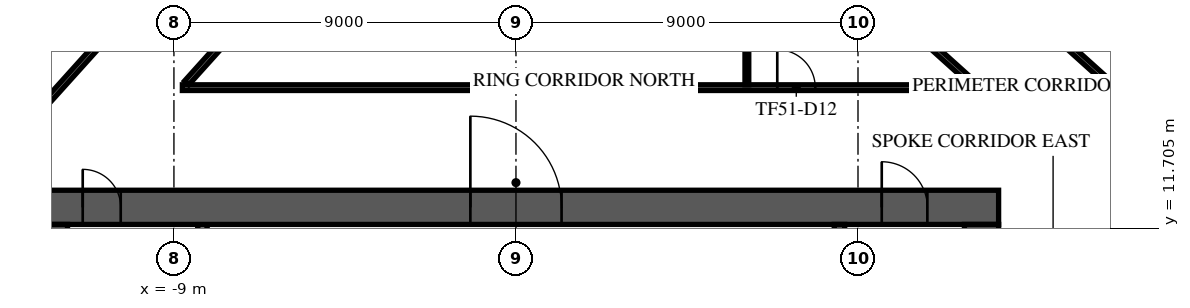
"""IFC4 building model, lengths in metres.
Left out: names, types, materials, properties, quantities, classifications, styles, units other than length and angle.
Written with IfcOpenShell. Run it as: python <this file> out.ifc"""

import sys

from ifc_helpers import new_model, si_unit, direction, frame, frame_2d, origin, place, context, subcontext, project, spatial, rectangle, extrude, element, fill, save


model = new_model("IFC4")
c1 = context("Model", 3, precision=1e-05, world=origin(), true_north=direction((0.0, 1.0)))
c2 = subcontext(c1, "Body", "Model", "MODEL_VIEW")
j1 = project(units=[si_unit("LENGTHUNIT", "METRE"), si_unit("PLANEANGLEUNIT", "RADIAN")], contexts=[c1])
p1 = place(None, origin())
s1 = spatial("IfcSite", under=j1, at=p1, CompositionType="ELEMENT")
p2 = place(p1, origin())
s2 = spatial("IfcBuilding", under=s1, at=p2, CompositionType="ELEMENT")
p3 = place(p2, frame((0.0, 0.0, 217.3)))
s3 = spatial("IfcBuildingStorey", under=s2, at=p3, CompositionType="ELEMENT", Elevation=217.3)
p4 = place(p3, frame((-12.7, 12.25, 0.0), z_axis=(0.0, 0.0, 1.0), x_axis=(1.0, 0.0, 0.0)))
e1 = element("IfcWall", 1, at=p4, inside=s3, PredefinedType="SHEAR", context=c2, shape_type="SweptSolid", body=[
    extrude(rectangle(XDim=25.4, YDim=0.9, at=frame_2d((12.7, 0.0))), origin(), (0.0, 0.0, 1.0), 3.62),
])
p5 = place(p4, frame((11.5, 0.0, 0.0)))
e2 = element("IfcOpeningElement", 2, at=p5, cuts=e1, PredefinedType="OPENING", context=c2, shape_type="SweptSolid", body=[
    extrude(rectangle(XDim=2.4, YDim=2.4, at=frame_2d((1.2, 1.2))), frame((0.0, 0.46, 0.0), z_axis=(0.0, -1.0, 0.0), x_axis=(1.0, 0.0, 0.0)), (0.0, 0.0, 1.0), 0.92),
])
p6 = place(p4, frame((22.325, 0.0, 0.0)))
e3 = element("IfcOpeningElement", 3, at=p6, cuts=e1, PredefinedType="OPENING", context=c2, shape_type="SweptSolid", body=[
    extrude(rectangle(XDim=1.2, YDim=2.1, at=frame_2d((0.6, 1.05))), frame((0.0, 0.46, 0.0), z_axis=(0.0, -1.0, 0.0), x_axis=(1.0, 0.0, 0.0)), (0.0, 0.0, 1.0), 0.92),
])
p7 = place(p4, frame((1.3, 0.0, 0.0)))
e4 = element("IfcOpeningElement", 4, at=p7, cuts=e1, PredefinedType="OPENING", context=c2, shape_type="SweptSolid", body=[
    extrude(rectangle(XDim=1.0, YDim=2.1, at=frame_2d((0.5, 1.05))), frame((0.0, 0.46, 0.0), z_axis=(0.0, -1.0, 0.0), x_axis=(1.0, 0.0, 0.0)), (0.0, 0.0, 1.0), 0.92),
])
p8 = place(p3, frame((12.25, -11.8, 0.0), z_axis=(0.0, 0.0, 1.0), x_axis=(0.0, 1.0, 0.0)))
e5 = element("IfcWall", 5, at=p8, inside=s3, PredefinedType="SHEAR", context=c2, shape_type="SweptSolid", body=[
    extrude(rectangle(XDim=23.6, YDim=0.9, at=frame_2d((11.8, 0.0))), origin(), (0.0, 0.0, 1.0), 3.62),
])
p9 = place(p8, frame((10.6, 0.0, 0.0)))
e6 = element("IfcOpeningElement", 6, at=p9, cuts=e5, PredefinedType="OPENING", context=c2, shape_type="SweptSolid", body=[
    extrude(rectangle(XDim=2.4, YDim=2.4, at=frame_2d((1.2, 1.2))), frame((0.0, 0.46, 0.0), z_axis=(0.0, -1.0, 0.0), x_axis=(1.0, 0.0, 0.0)), (0.0, 0.0, 1.0), 0.92),
])
p10 = place(p3, frame((-12.25, -11.8, 0.0), z_axis=(0.0, 0.0, 1.0), x_axis=(0.0, 1.0, 0.0)))
e7 = element("IfcWall", 7, at=p10, inside=s3, PredefinedType="SHEAR", context=c2, shape_type="SweptSolid", body=[
    extrude(rectangle(XDim=23.6, YDim=0.9, at=frame_2d((11.8, 0.0))), origin(), (0.0, 0.0, 1.0), 3.62),
])
p11 = place(p10, frame((10.6, 0.0, 0.0)))
e8 = element("IfcOpeningElement", 8, at=p11, cuts=e7, PredefinedType="OPENING", context=c2, shape_type="SweptSolid", body=[
    extrude(rectangle(XDim=2.4, YDim=2.4, at=frame_2d((1.2, 1.2))), frame((0.0, 0.46, 0.0), z_axis=(0.0, -1.0, 0.0), x_axis=(1.0, 0.0, 0.0)), (0.0, 0.0, 1.0), 0.92),
])
p12 = place(p3, frame((8.512, 4.55, 0.0), z_axis=(0.0, 0.0, 1.0), x_axis=(0.0, 1.0, 0.0)))
e9 = element("IfcWall", 9, at=p12, inside=s3, PredefinedType="SOLIDWALL", context=c2, shape_type="SweptSolid", body=[
    extrude(rectangle(XDim=7.25, YDim=0.275, at=frame_2d((3.625, 0.0))), origin(), (0.0, 0.0, 1.0), 3.62),
])
p13 = place(p12, frame((6.0, 0.0, 0.0)))
e10 = element("IfcOpeningElement", 10, at=p13, cuts=e9, PredefinedType="OPENING", context=c2, shape_type="SweptSolid", body=[
    extrude(rectangle(XDim=1.0, YDim=2.1, at=frame_2d((0.5, 1.05))), frame((0.0, 0.147, 0.0), z_axis=(0.0, -1.0, 0.0), x_axis=(1.0, 0.0, 0.0)), (0.0, 0.0, 1.0), 0.295),
])
p14 = place(p3, frame((-8.25, 8.805, 0.0), z_axis=(0.0, 0.0, 1.0), x_axis=(0.0, 1.0, 0.0)))
e11 = element("IfcWall", 11, at=p14, inside=s3, PredefinedType="PARTITIONING", context=c2, shape_type="SweptSolid", body=[
    extrude(rectangle(XDim=2.99, YDim=0.25, at=frame_2d((1.495, 0.0))), origin(), (0.0, 0.0, 1.0), 3.62),
])
p15 = place(p14, frame((0.895, 0.0, 0.0)))
e12 = element("IfcOpeningElement", 12, at=p15, cuts=e11, PredefinedType="OPENING", context=c2, shape_type="SweptSolid", body=[
    extrude(rectangle(XDim=1.0, YDim=2.1, at=frame_2d((0.5, 1.05))), frame((0.0, 0.135, 0.0), z_axis=(0.0, -1.0, 0.0), x_axis=(1.0, 0.0, 0.0)), (0.0, 0.0, 1.0), 0.27),
])
p16 = place(p3, frame((-1.962, 34.735, 0.0), z_axis=(0.0, 0.0, 1.0), x_axis=(-0.669133181838, -0.743142506497, 0.0)))
e13 = element("IfcWall", 13, at=p16, inside=s3, PredefinedType="STANDARD", context=c2, shape_type="SweptSolid", body=[
    extrude(rectangle(XDim=49.0, YDim=0.6, at=frame_2d((24.5, 0.0))), origin(), (0.0, 0.0, 1.0), 3.62),
])
p17 = place(p16, frame((1.227, 0.0, 0.9)))
e14 = element("IfcOpeningElement", 14, at=p17, cuts=e13, PredefinedType="OPENING", context=c2, shape_type="SweptSolid", body=[
    extrude(rectangle(XDim=2.0, YDim=2.1, at=frame_2d((1.0, 1.05))), frame((0.0, 0.31, 0.0), z_axis=(0.0, -1.0, 0.0), x_axis=(1.0, 0.0, 0.0)), (0.0, 0.0, 1.0), 0.62),
])
p18 = place(p16, frame((5.682, 0.0, 0.9)))
e15 = element("IfcOpeningElement", 15, at=p18, cuts=e13, PredefinedType="OPENING", context=c2, shape_type="SweptSolid", body=[
    extrude(rectangle(XDim=2.0, YDim=2.1, at=frame_2d((1.0, 1.05))), frame((0.0, 0.31, 0.0), z_axis=(0.0, -1.0, 0.0), x_axis=(1.0, 0.0, 0.0)), (0.0, 0.0, 1.0), 0.62),
])
p19 = place(p16, frame((10.136, 0.0, 0.9)))
e16 = element("IfcOpeningElement", 16, at=p19, cuts=e13, PredefinedType="OPENING", context=c2, shape_type="SweptSolid", body=[
    extrude(rectangle(XDim=2.0, YDim=2.1, at=frame_2d((1.0, 1.05))), frame((0.0, 0.31, 0.0), z_axis=(0.0, -1.0, 0.0), x_axis=(1.0, 0.0, 0.0)), (0.0, 0.0, 1.0), 0.62),
])
p20 = place(p16, frame((14.591, 0.0, 0.9)))
e17 = element("IfcOpeningElement", 17, at=p20, cuts=e13, PredefinedType="OPENING", context=c2, shape_type="SweptSolid", body=[
    extrude(rectangle(XDim=2.0, YDim=2.1, at=frame_2d((1.0, 1.05))), frame((0.0, 0.31, 0.0), z_axis=(0.0, -1.0, 0.0), x_axis=(1.0, 0.0, 0.0)), (0.0, 0.0, 1.0), 0.62),
])
p21 = place(p16, frame((19.045, 0.0, 0.9)))
e18 = element("IfcOpeningElement", 18, at=p21, cuts=e13, PredefinedType="OPENING", context=c2, shape_type="SweptSolid", body=[
    extrude(rectangle(XDim=2.0, YDim=2.1, at=frame_2d((1.0, 1.05))), frame((0.0, 0.31, 0.0), z_axis=(0.0, -1.0, 0.0), x_axis=(1.0, 0.0, 0.0)), (0.0, 0.0, 1.0), 0.62),
])
p22 = place(p16, frame((23.5, 0.0, 0.9)))
e19 = element("IfcOpeningElement", 19, at=p22, cuts=e13, PredefinedType="OPENING", context=c2, shape_type="SweptSolid", body=[
    extrude(rectangle(XDim=2.0, YDim=2.1, at=frame_2d((1.0, 1.05))), frame((0.0, 0.31, 0.0), z_axis=(0.0, -1.0, 0.0), x_axis=(1.0, 0.0, 0.0)), (0.0, 0.0, 1.0), 0.62),
])
p23 = place(p16, frame((27.955, 0.0, 0.9)))
e20 = element("IfcOpeningElement", 20, at=p23, cuts=e13, PredefinedType="OPENING", context=c2, shape_type="SweptSolid", body=[
    extrude(rectangle(XDim=2.0, YDim=2.1, at=frame_2d((1.0, 1.05))), frame((0.0, 0.31, 0.0), z_axis=(0.0, -1.0, 0.0), x_axis=(1.0, 0.0, 0.0)), (0.0, 0.0, 1.0), 0.62),
])
p24 = place(p16, frame((32.409, 0.0, 0.9)))
e21 = element("IfcOpeningElement", 21, at=p24, cuts=e13, PredefinedType="OPENING", context=c2, shape_type="SweptSolid", body=[
    extrude(rectangle(XDim=2.0, YDim=2.1, at=frame_2d((1.0, 1.05))), frame((0.0, 0.31, 0.0), z_axis=(0.0, -1.0, 0.0), x_axis=(1.0, 0.0, 0.0)), (0.0, 0.0, 1.0), 0.62),
])
p25 = place(p16, frame((36.864, 0.0, 0.9)))
e22 = element("IfcOpeningElement", 22, at=p25, cuts=e13, PredefinedType="OPENING", context=c2, shape_type="SweptSolid", body=[
    extrude(rectangle(XDim=2.0, YDim=2.1, at=frame_2d((1.0, 1.05))), frame((0.0, 0.31, 0.0), z_axis=(0.0, -1.0, 0.0), x_axis=(1.0, 0.0, 0.0)), (0.0, 0.0, 1.0), 0.62),
])
p26 = place(p16, frame((41.318, 0.0, 0.9)))
e23 = element("IfcOpeningElement", 23, at=p26, cuts=e13, PredefinedType="OPENING", context=c2, shape_type="SweptSolid", body=[
    extrude(rectangle(XDim=2.0, YDim=2.1, at=frame_2d((1.0, 1.05))), frame((0.0, 0.31, 0.0), z_axis=(0.0, -1.0, 0.0), x_axis=(1.0, 0.0, 0.0)), (0.0, 0.0, 1.0), 0.62),
])
p27 = place(p16, frame((45.773, 0.0, 0.9)))
e24 = element("IfcOpeningElement", 24, at=p27, cuts=e13, PredefinedType="OPENING", context=c2, shape_type="SweptSolid", body=[
    extrude(rectangle(XDim=2.0, YDim=2.1, at=frame_2d((1.0, 1.05))), frame((0.0, 0.31, 0.0), z_axis=(0.0, -1.0, 0.0), x_axis=(1.0, 0.0, 0.0)), (0.0, 0.0, 1.0), 0.62),
])
p28 = place(p3, frame((34.365, 9.023, 0.0), z_axis=(0.0, 0.0, 1.0), x_axis=(-0.743146896498, 0.66912830625, 0.0)))
e25 = element("IfcWall", 25, at=p28, inside=s3, PredefinedType="STANDARD", context=c2, shape_type="SweptSolid", body=[
    extrude(rectangle(XDim=39.0, YDim=0.6, at=frame_2d((19.5, 0.0))), origin(), (0.0, 0.0, 1.0), 3.62),
])
p29 = place(p28, frame((1.217, 0.0, 0.9)))
e26 = element("IfcOpeningElement", 26, at=p29, cuts=e25, PredefinedType="OPENING", context=c2, shape_type="SweptSolid", body=[
    extrude(rectangle(XDim=1.9, YDim=2.1, at=frame_2d((0.95, 1.05))), frame((0.0, 0.31, 0.0), z_axis=(0.0, -1.0, 0.0), x_axis=(1.0, 0.0, 0.0)), (0.0, 0.0, 1.0), 0.62),
])
p30 = place(p28, frame((5.55, 0.0, 0.9)))
e27 = element("IfcOpeningElement", 27, at=p30, cuts=e25, PredefinedType="OPENING", context=c2, shape_type="SweptSolid", body=[
    extrude(rectangle(XDim=1.9, YDim=2.1, at=frame_2d((0.95, 1.05))), frame((0.0, 0.31, 0.0), z_axis=(0.0, -1.0, 0.0), x_axis=(1.0, 0.0, 0.0)), (0.0, 0.0, 1.0), 0.62),
])
p31 = place(p28, frame((9.883, 0.0, 0.9)))
e28 = element("IfcOpeningElement", 28, at=p31, cuts=e25, PredefinedType="OPENING", context=c2, shape_type="SweptSolid", body=[
    extrude(rectangle(XDim=1.9, YDim=2.1, at=frame_2d((0.95, 1.05))), frame((0.0, 0.31, 0.0), z_axis=(0.0, -1.0, 0.0), x_axis=(1.0, 0.0, 0.0)), (0.0, 0.0, 1.0), 0.62),
])
p32 = place(p28, frame((14.217, 0.0, 0.9)))
e29 = element("IfcOpeningElement", 29, at=p32, cuts=e25, PredefinedType="OPENING", context=c2, shape_type="SweptSolid", body=[
    extrude(rectangle(XDim=1.9, YDim=2.1, at=frame_2d((0.95, 1.05))), frame((0.0, 0.31, 0.0), z_axis=(0.0, -1.0, 0.0), x_axis=(1.0, 0.0, 0.0)), (0.0, 0.0, 1.0), 0.62),
])
p33 = place(p28, frame((18.55, 0.0, 0.9)))
e30 = element("IfcOpeningElement", 30, at=p33, cuts=e25, PredefinedType="OPENING", context=c2, shape_type="SweptSolid", body=[
    extrude(rectangle(XDim=1.9, YDim=2.1, at=frame_2d((0.95, 1.05))), frame((0.0, 0.31, 0.0), z_axis=(0.0, -1.0, 0.0), x_axis=(1.0, 0.0, 0.0)), (0.0, 0.0, 1.0), 0.62),
])
p34 = place(p28, frame((22.883, 0.0, 0.9)))
e31 = element("IfcOpeningElement", 31, at=p34, cuts=e25, PredefinedType="OPENING", context=c2, shape_type="SweptSolid", body=[
    extrude(rectangle(XDim=1.9, YDim=2.1, at=frame_2d((0.95, 1.05))), frame((0.0, 0.31, 0.0), z_axis=(0.0, -1.0, 0.0), x_axis=(1.0, 0.0, 0.0)), (0.0, 0.0, 1.0), 0.62),
])
p35 = place(p28, frame((27.217, 0.0, 0.9)))
e32 = element("IfcOpeningElement", 32, at=p35, cuts=e25, PredefinedType="OPENING", context=c2, shape_type="SweptSolid", body=[
    extrude(rectangle(XDim=1.9, YDim=2.1, at=frame_2d((0.95, 1.05))), frame((0.0, 0.31, 0.0), z_axis=(0.0, -1.0, 0.0), x_axis=(1.0, 0.0, 0.0)), (0.0, 0.0, 1.0), 0.62),
])
p36 = place(p28, frame((31.55, 0.0, 0.9)))
e33 = element("IfcOpeningElement", 33, at=p36, cuts=e25, PredefinedType="OPENING", context=c2, shape_type="SweptSolid", body=[
    extrude(rectangle(XDim=1.9, YDim=2.1, at=frame_2d((0.95, 1.05))), frame((0.0, 0.31, 0.0), z_axis=(0.0, -1.0, 0.0), x_axis=(1.0, 0.0, 0.0)), (0.0, 0.0, 1.0), 0.62),
])
p37 = place(p28, frame((35.883, 0.0, 0.9)))
e34 = element("IfcOpeningElement", 34, at=p37, cuts=e25, PredefinedType="OPENING", context=c2, shape_type="SweptSolid", body=[
    extrude(rectangle(XDim=1.9, YDim=2.1, at=frame_2d((0.95, 1.05))), frame((0.0, 0.31, 0.0), z_axis=(0.0, -1.0, 0.0), x_axis=(1.0, 0.0, 0.0)), (0.0, 0.0, 1.0), 0.62),
])
p38 = place(p3, frame((-24.952, 1.024, 0.0), z_axis=(0.0, 0.0, 1.0), x_axis=(0.66912723064, 0.743147864974, 0.0)))
e35 = element("IfcWall", 35, at=p38, inside=s3, PredefinedType="PARTITIONING", context=c2, shape_type="SweptSolid", body=[
    extrude(rectangle(XDim=31.871, YDim=0.15, at=frame_2d((15.936, 0.0))), origin(), (0.0, 0.0, 1.0), 3.17),
])
p39 = place(p38, frame((16.202, 0.0, 0.0)))
e36 = element("IfcOpeningElement", 36, at=p39, cuts=e35, PredefinedType="OPENING", context=c2, shape_type="SweptSolid", body=[
    extrude(rectangle(XDim=1.0, YDim=2.1, at=frame_2d((0.5, 1.05))), frame((0.0, 0.085, 0.0), z_axis=(0.0, -1.0, 0.0), x_axis=(1.0, 0.0, 0.0)), (0.0, 0.0, 1.0), 0.17),
])
p40 = place(p38, frame((28.08, 0.0, 0.0)))
e37 = element("IfcOpeningElement", 37, at=p40, cuts=e35, PredefinedType="OPENING", context=c2, shape_type="SweptSolid", body=[
    extrude(rectangle(XDim=1.8, YDim=2.1, at=frame_2d((0.9, 1.05))), frame((0.0, 0.085, 0.0), z_axis=(0.0, -1.0, 0.0), x_axis=(1.0, 0.0, 0.0)), (0.0, 0.0, 1.0), 0.17),
])
p41 = place(p38, frame((22.58, 0.0, 0.0)))
e38 = element("IfcOpeningElement", 38, at=p41, cuts=e35, PredefinedType="OPENING", context=c2, shape_type="SweptSolid", body=[
    extrude(rectangle(XDim=1.0, YDim=2.1, at=frame_2d((0.5, 1.05))), frame((0.0, 0.085, 0.0), z_axis=(0.0, -1.0, 0.0), x_axis=(1.0, 0.0, 0.0)), (0.0, 0.0, 1.0), 0.17),
])
p42 = place(p3, frame((-8.778, 15.4, 0.0), z_axis=(0.0, 0.0, 1.0), x_axis=(1.0, 0.0, 0.0)))
e39 = element("IfcWall", 39, at=p42, inside=s3, PredefinedType="PARTITIONING", context=c2, shape_type="SweptSolid", body=[
    extrude(rectangle(XDim=20.934, YDim=0.15, at=frame_2d((10.467, 0.0))), origin(), (0.0, 0.0, 1.0), 3.17),
])
p43 = place(p42, frame((15.654, 0.0, 0.0)))
e40 = element("IfcOpeningElement", 40, at=p43, cuts=e39, PredefinedType="OPENING", context=c2, shape_type="SweptSolid", body=[
    extrude(rectangle(XDim=1.0, YDim=2.1, at=frame_2d((0.5, 1.05))), frame((0.0, 0.085, 0.0), z_axis=(0.0, -1.0, 0.0), x_axis=(1.0, 0.0, 0.0)), (0.0, 0.0, 1.0), 0.17),
])
p44 = place(p3, frame((-8.665, 15.525, 0.0), z_axis=(0.0, 0.0, 1.0), x_axis=(0.669084664521, 0.743186189123, 0.0)))
e41 = element("IfcWall", 41, at=p44, inside=s3, PredefinedType="PARTITIONING", context=c2, shape_type="SweptSolid", body=[
    extrude(rectangle(XDim=10.121, YDim=0.15, at=frame_2d((5.061, 0.0))), origin(), (0.0, 0.0, 1.0), 3.17),
])
p45 = place(p3, frame((3.522, 23.174, 0.0), z_axis=(0.0, 0.0, 1.0), x_axis=(0.743165539408, -0.669107600492, 0.0)))
e42 = element("IfcWall", 42, at=p45, inside=s3, PredefinedType="PARTITIONING", context=c2, shape_type="SweptSolid", body=[
    extrude(rectangle(XDim=11.423, YDim=0.15, at=frame_2d((5.711, 0.0))), origin(), (0.0, 0.0, 1.0), 3.17),
])
p46 = place(p3, frame((5.128, 24.958, 0.0), z_axis=(0.0, 0.0, 1.0), x_axis=(0.743144813636, -0.66913061951, 0.0)))
e43 = element("IfcWall", 43, at=p46, inside=s3, PredefinedType="PARTITIONING", context=c2, shape_type="SweptSolid", body=[
    extrude(rectangle(XDim=25.854, YDim=0.15, at=frame_2d((12.927, 0.0))), origin(), (0.0, 0.0, 1.0), 3.17),
])
p47 = place(p46, frame((8.946, 0.0, 0.0)))
e44 = element("IfcOpeningElement", 44, at=p47, cuts=e43, PredefinedType="OPENING", context=c2, shape_type="SweptSolid", body=[
    extrude(rectangle(XDim=1.0, YDim=2.1, at=frame_2d((0.5, 1.05))), frame((0.0, 0.085, 0.0), z_axis=(0.0, -1.0, 0.0), x_axis=(1.0, 0.0, 0.0)), (0.0, 0.0, 1.0), 0.17),
])
p48 = place(p46, frame((20.29, 0.0, 0.0)))
e45 = element("IfcOpeningElement", 45, at=p48, cuts=e43, PredefinedType="OPENING", context=c2, shape_type="SweptSolid", body=[
    extrude(rectangle(XDim=1.8, YDim=2.1, at=frame_2d((0.9, 1.05))), frame((0.0, 0.085, 0.0), z_axis=(0.0, -1.0, 0.0), x_axis=(1.0, 0.0, 0.0)), (0.0, 0.0, 1.0), 0.17),
])
p49 = place(p3, frame((6.076, 15.475, 0.0), z_axis=(0.0, 0.0, 1.0), x_axis=(0.0, 1.0, 0.0)))
e46 = element("IfcWall", 46, at=p49, inside=s3, PredefinedType="PARTITIONING", context=c2, shape_type="SweptSolid", body=[
    extrude(rectangle(XDim=5.253, YDim=0.1, at=frame_2d((2.626, 0.0))), origin(), (0.0, 0.0, 1.0), 3.17),
])
p50 = place(p5, origin())
e47 = element("IfcDoor", 47, at=p50, inside=s3, OperationType="SINGLE_SWING_LEFT", PredefinedType="DOOR", context=c2, shape_type="SweptSolid", body=[
    extrude(rectangle(XDim=2.4, YDim=2.4, at=frame_2d((1.2, 1.2))), frame((0.0, 0.025, 0.0), z_axis=(0.0, -1.0, 0.0), x_axis=(1.0, 0.0, 0.0)), (0.0, 0.0, 1.0), 0.05),
])
fill(e2, e47)
p51 = place(p6, origin())
e48 = element("IfcDoor", 48, at=p51, inside=s3, OperationType="SINGLE_SWING_LEFT", PredefinedType="DOOR", context=c2, shape_type="SweptSolid", body=[
    extrude(rectangle(XDim=1.2, YDim=2.1, at=frame_2d((0.6, 1.05))), frame((0.0, 0.025, 0.0), z_axis=(0.0, -1.0, 0.0), x_axis=(1.0, 0.0, 0.0)), (0.0, 0.0, 1.0), 0.05),
])
fill(e3, e48)
p52 = place(p7, origin())
e49 = element("IfcDoor", 49, at=p52, inside=s3, OperationType="SINGLE_SWING_LEFT", PredefinedType="DOOR", context=c2, shape_type="SweptSolid", body=[
    extrude(rectangle(XDim=1.0, YDim=2.1, at=frame_2d((0.5, 1.05))), frame((0.0, 0.025, 0.0), z_axis=(0.0, -1.0, 0.0), x_axis=(1.0, 0.0, 0.0)), (0.0, 0.0, 1.0), 0.05),
])
fill(e4, e49)
p53 = place(p43, origin())
e50 = element("IfcDoor", 50, at=p53, inside=s3, OperationType="SINGLE_SWING_LEFT", PredefinedType="DOOR", context=c2, shape_type="SweptSolid", body=[
    extrude(rectangle(XDim=1.0, YDim=2.1, at=frame_2d((0.5, 1.05))), frame((0.0, 0.025, 0.0), z_axis=(0.0, -1.0, 0.0), x_axis=(1.0, 0.0, 0.0)), (0.0, 0.0, 1.0), 0.05),
])
fill(e40, e50)
save(model, sys.argv[1])
